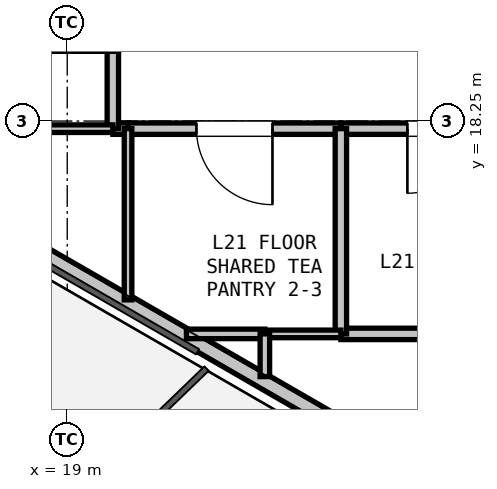
"""IFC4 building model, lengths in metres.
Left out: names, types, materials, properties, quantities, classifications, styles, units other than length and angle.
Written with IfcOpenShell. Run it as: python <this file> out.ifc"""

import sys

from ifc_helpers import new_model, si_unit, direction, frame, frame_2d, origin, place, context, subcontext, project, spatial, rectangle, extrude, element, fill, save


model = new_model("IFC4")
c1 = context("Model", 3, precision=1e-05, world=origin(), true_north=direction((0.0, 1.0)))
c2 = subcontext(c1, "Body", "Model", "MODEL_VIEW")
j1 = project(units=[si_unit("LENGTHUNIT", "METRE"), si_unit("PLANEANGLEUNIT", "RADIAN")], contexts=[c1])
p1 = place(None, origin())
s1 = spatial("IfcSite", under=j1, at=p1, CompositionType="ELEMENT")
p2 = place(p1, origin())
s2 = spatial("IfcBuilding", under=s1, at=p2, CompositionType="ELEMENT")
p3 = place(p2, frame((0.0, 0.0, 80.1)))
s3 = spatial("IfcBuildingStorey", under=s2, at=p3, CompositionType="ELEMENT", Elevation=80.1)
p4 = place(p3, frame((26.845, 11.788, 0.0), z_axis=(0.0, 0.0, 1.0), x_axis=(-0.866027010039, 0.499997217876, 0.0)))
e1 = element("IfcWall", 1, at=p4, inside=s3, PredefinedType="PARAPET", context=c2, shape_type="SweptSolid", body=[
    extrude(rectangle(XDim=11.229, YDim=0.2, at=frame_2d((5.615, 0.0))), origin(), (0.0, 0.0, 1.0), 0.2),
])
p5 = place(p3, frame((25.2, 18.15, 0.0), z_axis=(0.0, 0.0, 1.0), x_axis=(-1.0, 0.0, 0.0)))
e2 = element("IfcWall", 2, at=p5, inside=s3, PredefinedType="PARTITIONING", context=c2, shape_type="SweptSolid", body=[
    extrude(rectangle(XDim=2.6, YDim=0.15, at=frame_2d((1.3, 0.0))), origin(), (0.0, 0.0, 1.0), 2.423),
])
p6 = place(p5, frame((0.875, 0.0, 0.0)))
e3 = element("IfcOpeningElement", 3, at=p6, cuts=e2, PredefinedType="OPENING", context=c2, shape_type="SweptSolid", body=[
    extrude(rectangle(XDim=0.85, YDim=2.1, at=frame_2d((0.425, 1.05))), frame((0.0, 0.085, 0.0), z_axis=(0.0, -1.0, 0.0), x_axis=(1.0, 0.0, 0.0)), (0.0, 0.0, 1.0), 0.17),
])
p7 = place(p3, frame((22.6, 18.15, 0.0), z_axis=(0.0, 0.0, 1.0), x_axis=(-1.0, 0.0, 0.0)))
e4 = element("IfcWall", 4, at=p7, inside=s3, PredefinedType="PARTITIONING", context=c2, shape_type="SweptSolid", body=[
    extrude(rectangle(XDim=2.8, YDim=0.15, at=frame_2d((1.4, 0.0))), origin(), (0.0, 0.0, 1.0), 3.05),
])
p8 = place(p7, frame((0.9, 0.0, 0.0)))
e5 = element("IfcOpeningElement", 5, at=p8, cuts=e4, PredefinedType="OPENING", context=c2, shape_type="SweptSolid", body=[
    extrude(rectangle(XDim=1.0, YDim=2.15, at=frame_2d((0.5, 1.075))), frame((0.0, 0.085, 0.0), z_axis=(0.0, -1.0, 0.0), x_axis=(1.0, 0.0, 0.0)), (0.0, 0.0, 1.0), 0.17),
])
p9 = place(p3, frame((19.8, 18.15, 0.0), z_axis=(0.0, 0.0, 1.0), x_axis=(-1.0, 0.0, 0.0)))
e6 = element("IfcWall", 6, at=p9, inside=s3, PredefinedType="PARTITIONING", context=c2, shape_type="SweptSolid", body=[
    extrude(rectangle(XDim=0.2, YDim=0.15, at=frame_2d((0.1, 0.0))), origin(), (0.0, 0.0, 1.0), 3.05),
])
p10 = place(p3, frame((19.6, 18.15, 0.0), z_axis=(0.0, 0.0, 1.0), x_axis=(0.0, 1.0, 0.0)))
e7 = element("IfcWall", 7, at=p10, inside=s3, PredefinedType="PARTITIONING", context=c2, shape_type="SweptSolid", body=[
    extrude(rectangle(XDim=3.0, YDim=0.15, at=frame_2d((1.5, 0.0))), origin(), (0.0, 0.0, 1.0), 2.423),
])
p11 = place(p10, frame((1.0, 0.0, 0.0)))
e8 = element("IfcOpeningElement", 8, at=p11, cuts=e7, PredefinedType="OPENING", context=c2, shape_type="SweptSolid", body=[
    extrude(rectangle(XDim=1.0, YDim=2.15, at=frame_2d((0.5, 1.075))), frame((0.0, 0.085, 0.0), z_axis=(0.0, -1.0, 0.0), x_axis=(1.0, 0.0, 0.0)), (0.0, 0.0, 1.0), 0.17),
])
p12 = place(p3, frame((19.6, 18.15, 0.0), z_axis=(0.0, 0.0, 1.0), x_axis=(-1.0, 0.0, 0.0)))
e9 = element("IfcWall", 9, at=p12, inside=s3, PredefinedType="PARTITIONING", context=c2, shape_type="SweptSolid", body=[
    extrude(rectangle(XDim=2.45, YDim=0.1, at=frame_2d((1.225, 0.0))), origin(), (0.0, 0.0, 1.0), 2.365),
])
p13 = place(p3, frame((25.2, 15.45, 0.0), z_axis=(0.0, 0.0, 1.0), x_axis=(-1.0, 0.0, 0.0)))
e10 = element("IfcWall", 10, at=p13, inside=s3, PredefinedType="PARTITIONING", context=c2, shape_type="SweptSolid", body=[
    extrude(rectangle(XDim=2.6, YDim=0.15, at=frame_2d((1.3, 0.0))), origin(), (0.0, 0.0, 1.0), 3.05),
])
p14 = place(p3, frame((22.6, 15.45, 0.0), z_axis=(0.0, 0.0, 1.0), x_axis=(0.0, 1.0, 0.0)))
e11 = element("IfcWall", 11, at=p14, inside=s3, PredefinedType="PARTITIONING", context=c2, shape_type="SweptSolid", body=[
    extrude(rectangle(XDim=2.7, YDim=0.15, at=frame_2d((1.35, 0.0))), origin(), (0.0, 0.0, 1.0), 3.05),
])
p15 = place(p3, frame((22.6, 15.45, 0.0), z_axis=(0.0, 0.0, 1.0), x_axis=(-1.0, 0.0, 0.0)))
e12 = element("IfcWall", 12, at=p15, inside=s3, PredefinedType="PARTITIONING", context=c2, shape_type="SweptSolid", body=[
    extrude(rectangle(XDim=1.0, YDim=0.1, at=frame_2d((0.5, 0.0))), origin(), (0.0, 0.0, 1.0), 2.365),
])
p16 = place(p3, frame((21.6, 15.45, 0.0), z_axis=(0.0, 0.0, 1.0), x_axis=(-1.0, 0.0, 0.0)))
e13 = element("IfcWall", 13, at=p16, inside=s3, PredefinedType="PARTITIONING", context=c2, shape_type="SweptSolid", body=[
    extrude(rectangle(XDim=1.032, YDim=0.125, at=frame_2d((0.516, 0.0))), origin(), (0.0, 0.0, 1.0), 2.365),
])
p17 = place(p3, frame((19.8, 15.897, 0.0), z_axis=(0.0, 0.0, 1.0), x_axis=(0.0, 1.0, 0.0)))
e14 = element("IfcWall", 14, at=p17, inside=s3, PredefinedType="PARTITIONING", context=c2, shape_type="SweptSolid", body=[
    extrude(rectangle(XDim=2.252, YDim=0.1, at=frame_2d((1.126, 0.0))), origin(), (0.0, 0.0, 1.0), 2.365),
])
p18 = place(p3, frame((21.6, 14.888, 0.0), z_axis=(0.0, 0.0, 1.0), x_axis=(0.0, 1.0, 0.0)))
e15 = element("IfcWall", 15, at=p18, inside=s3, PredefinedType="PARTITIONING", context=c2, shape_type="SweptSolid", body=[
    extrude(rectangle(XDim=0.562, YDim=0.125, at=frame_2d((0.281, 0.0))), origin(), (0.0, 0.0, 1.0), 2.365),
])
p19 = place(p6, origin())
e16 = element("IfcDoor", 16, at=p19, inside=s3, OperationType="SINGLE_SWING_RIGHT", PredefinedType="DOOR", context=c2, shape_type="SweptSolid", body=[
    extrude(rectangle(XDim=0.85, YDim=2.1, at=frame_2d((0.425, 1.05))), frame((0.0, 0.025, 0.0), z_axis=(0.0, -1.0, 0.0), x_axis=(1.0, 0.0, 0.0)), (0.0, 0.0, 1.0), 0.05),
])
fill(e3, e16)
p20 = place(p8, origin())
e17 = element("IfcDoor", 17, at=p20, inside=s3, OperationType="SINGLE_SWING_LEFT", PredefinedType="DOOR", context=c2, shape_type="SweptSolid", body=[
    extrude(rectangle(XDim=1.0, YDim=2.15, at=frame_2d((0.5, 1.075))), frame((0.0, 0.025, 0.0), z_axis=(0.0, -1.0, 0.0), x_axis=(1.0, 0.0, 0.0)), (0.0, 0.0, 1.0), 0.05),
])
fill(e5, e17)
save(model, sys.argv[1])
